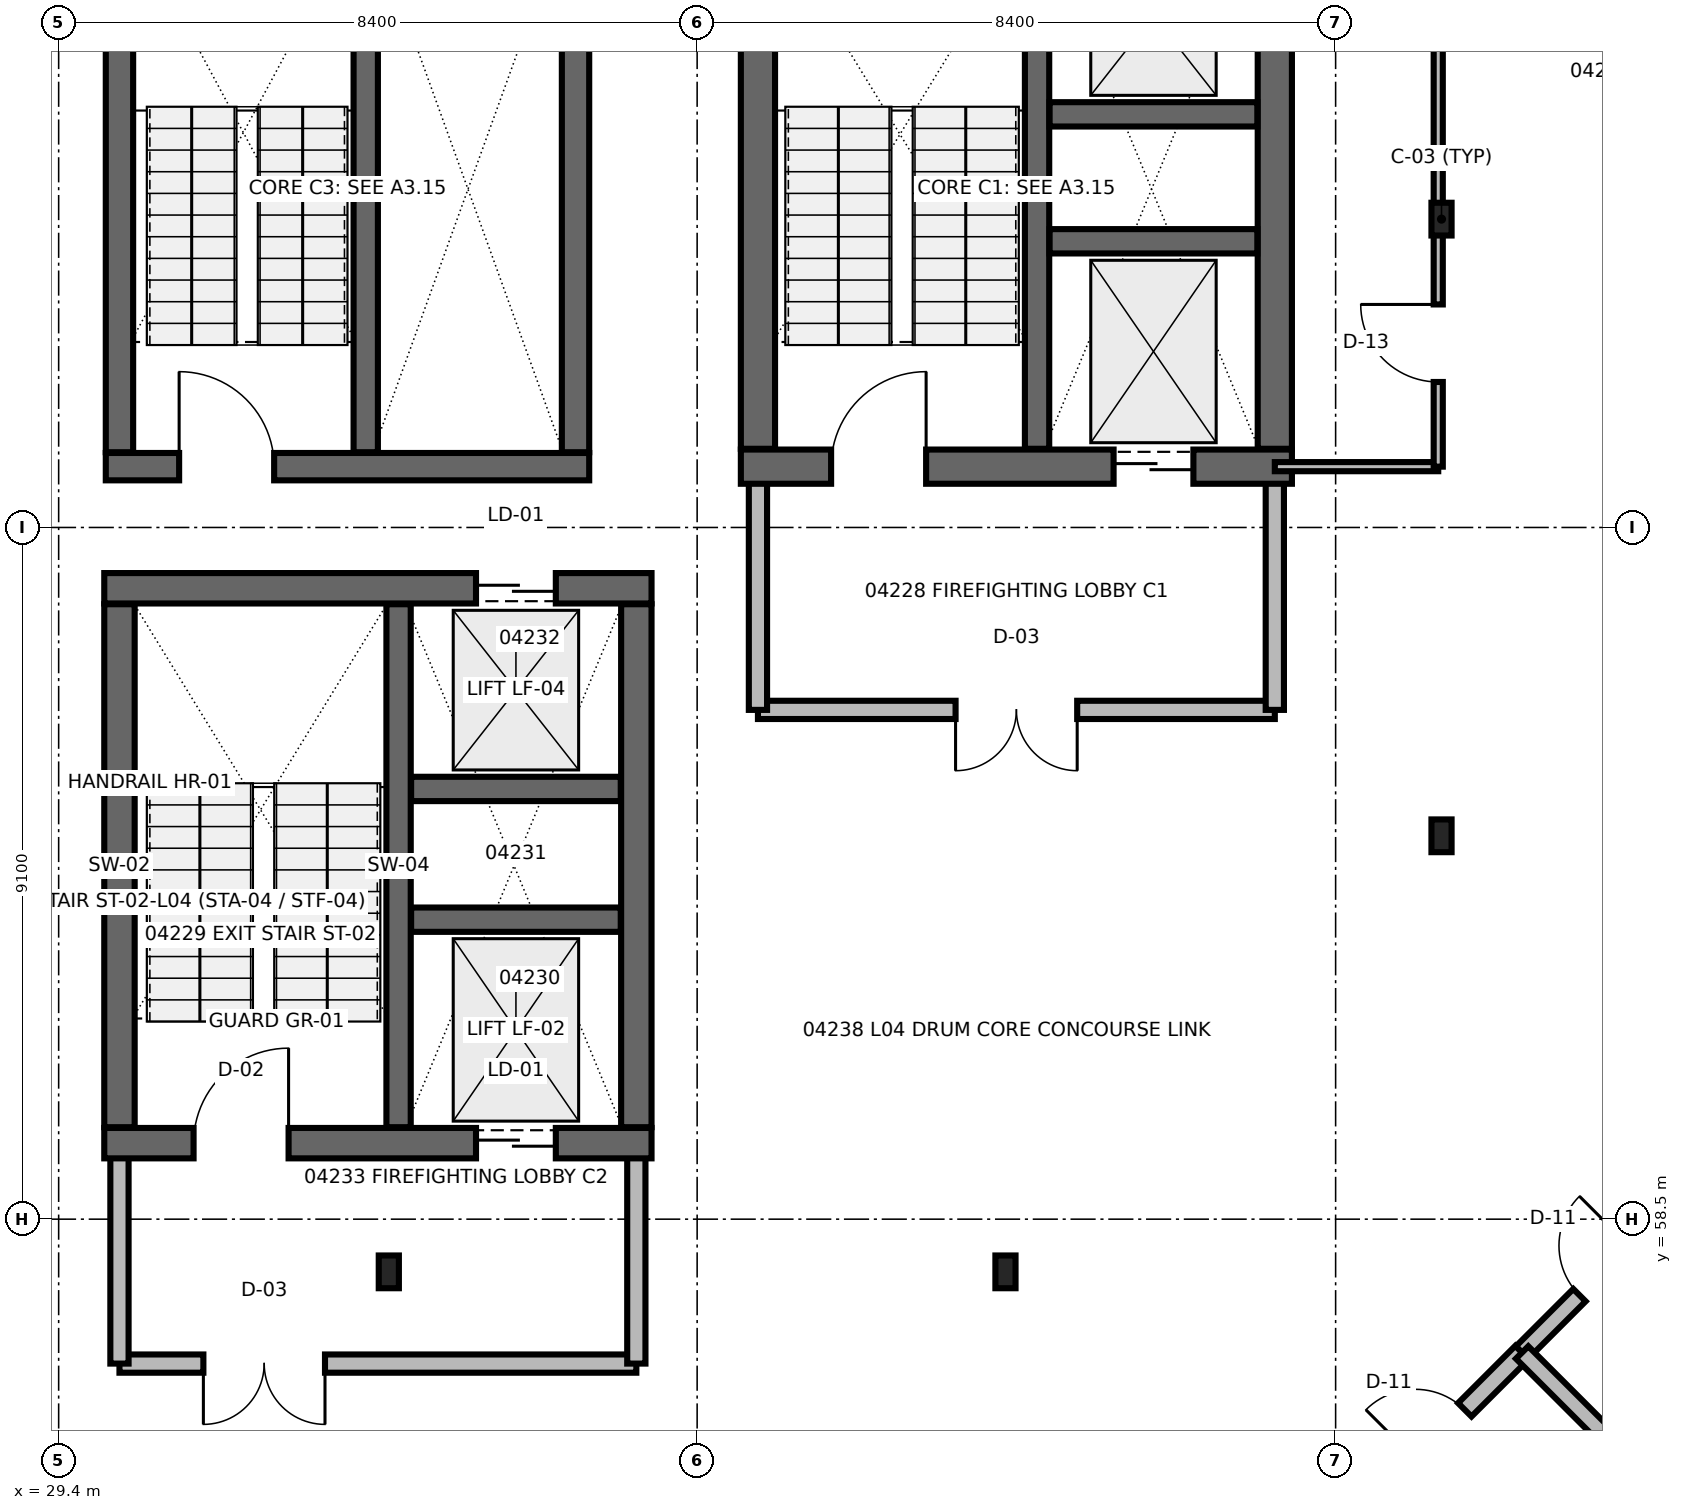
"""IFC4 building model, lengths in metres.
Left out: names, types, materials, properties, quantities, classifications, styles, units other than length and angle.
Written with IfcOpenShell. Run it as: python <this file> out.ifc"""

import sys

from ifc_helpers import new_model, si_unit, direction, frame, frame_2d, origin, origin_2d, place, context, subcontext, project, spatial, rectangle, i_section, extrude, element, fill, save


model = new_model("IFC4")
c1 = context("Model", 3, precision=1e-05, world=origin(), true_north=direction((0.0, 1.0)))
c2 = subcontext(c1, "Body", "Model", "MODEL_VIEW")
j1 = project(units=[si_unit("LENGTHUNIT", "METRE"), si_unit("PLANEANGLEUNIT", "RADIAN")], contexts=[c1])
p1 = place(None, origin())
s1 = spatial("IfcSite", under=j1, at=p1, CompositionType="ELEMENT")
p2 = place(p1, origin())
s2 = spatial("IfcBuilding", under=s1, at=p2, CompositionType="ELEMENT")
p3 = place(p2, frame((0.0, 0.0, 17.7)))
s3 = spatial("IfcBuildingStorey", under=s2, at=p3, CompositionType="ELEMENT", Elevation=17.7)
for number, where, z_axis, x_axis in (
    (1, (47.593, 71.656, 0.0), (0.0, 0.0, 1.0), (1.0, 0.0, 0.0)),
    (2, (33.744, 57.807, 0.0), (0.0, 0.0, 1.0), (1.0, 0.0, 0.0)),
    (3, (41.856, 57.807, 0.0), (0.0, 0.0, 1.0), (1.0, 0.0, 0.0)),
    (4, (47.593, 63.544, 0.0), (0.0, 0.0, 1.0), (1.0, 0.0, 0.0)),
):
    element("IfcColumn", number, at=place(p3, frame(where, z_axis=z_axis, x_axis=x_axis)), inside=s3, PredefinedType="COLUMN", context=c2, shape_type="SweptSolid", body=[
        extrude(i_section(OverallWidth=0.265, OverallDepth=0.431, WebThickness=0.015, FlangeThickness=0.025, at=origin_2d()), origin(), (0.0, 0.0, 1.0), 3.9),
    ])
p4 = place(p3, frame((49.072, 49.335, 0.0), z_axis=(0.0, 0.0, 1.0), x_axis=(0.707093322868, 0.707120239249, 0.0)))
e5 = element("IfcWall", 5, at=p4, inside=s3, PredefinedType="SOLIDWALL", context=c2, shape_type="SweptSolid", body=[
    extrude(rectangle(XDim=9.07, YDim=0.26, at=frame_2d((4.535, 0.0))), origin(), (0.0, 0.0, 1.0), 1.48),
])
p5 = place(p3, frame((38.6, 65.2, 0.0), z_axis=(0.0, 0.0, 1.0), x_axis=(1.0, 0.0, 0.0)))
e6 = element("IfcWall", 6, at=p5, inside=s3, PredefinedType="SOLIDWALL", context=c2, shape_type="SweptSolid", body=[
    extrude(rectangle(XDim=6.8, YDim=0.24, at=frame_2d((3.4, 0.0))), origin(), (0.0, 0.0, 1.0), 3.64),
])
p6 = place(p5, frame((2.6, 0.0, 0.0)))
e7 = element("IfcOpeningElement", 7, at=p6, cuts=e6, PredefinedType="OPENING", context=c2, shape_type="SweptSolid", body=[
    extrude(rectangle(XDim=1.6, YDim=2.2, at=frame_2d((0.8, 1.1))), frame((0.0, 0.13, 0.0), z_axis=(0.0, -1.0, 0.0), x_axis=(1.0, 0.0, 0.0)), (0.0, 0.0, 1.0), 0.26),
])
for number, where, z_axis, x_axis in (
    (8, (38.6, 68.4, 0.0), (0.0, 0.0, 1.0), (0.0, -1.0, 0.0)),
    (9, (45.4, 65.2, 0.0), (0.0, 0.0, 1.0), (0.0, 1.0, 0.0)),
):
    element("IfcWall", number, at=place(p3, frame(where, z_axis=z_axis, x_axis=x_axis)), inside=s3, PredefinedType="SOLIDWALL", context=c2, shape_type="SweptSolid", body=[
        extrude(rectangle(XDim=3.2, YDim=0.24, at=frame_2d((1.6, 0.0))), origin(), (0.0, 0.0, 1.0), 3.64),
    ])
p7 = place(p3, frame((38.375, 68.4, 0.0), z_axis=(0.0, 0.0, 1.0), x_axis=(1.0, 0.0, 0.0)))
e10 = element("IfcWall", 10, at=p7, inside=s3, PredefinedType="SHEAR", context=c2, shape_type="SweptSolid", body=[
    extrude(rectangle(XDim=7.25, YDim=0.45, at=frame_2d((3.625, 0.0))), origin(), (0.0, 0.0, 1.0), 3.62),
])
p8 = place(p7, frame((1.188, 0.0, 0.0)))
e11 = element("IfcOpeningElement", 11, at=p8, cuts=e10, PredefinedType="OPENING", context=c2, shape_type="SweptSolid", body=[
    extrude(rectangle(XDim=1.25, YDim=2.2, at=frame_2d((0.625, 1.1))), frame((0.0, 0.235, 0.0), z_axis=(0.0, -1.0, 0.0), x_axis=(1.0, 0.0, 0.0)), (0.0, 0.0, 1.0), 0.47),
])
p9 = place(p7, frame((4.904, 0.0, 0.0)))
e12 = element("IfcOpeningElement", 12, at=p9, cuts=e10, PredefinedType="OPENING", context=c2, shape_type="SweptSolid", body=[
    extrude(rectangle(XDim=1.05, YDim=2.15, at=frame_2d((0.525, 1.075))), frame((0.0, 0.235, 0.0), z_axis=(0.0, -1.0, 0.0), x_axis=(1.0, 0.0, 0.0)), (0.0, 0.0, 1.0), 0.47),
])
for number, where, z_axis, x_axis in (
    (13, (38.6, 68.635, 0.0), (0.0, 0.0, 1.0), (0.0, 1.0, 0.0)),
    (14, (45.4, 68.635, 0.0), (0.0, 0.0, 1.0), (0.0, 1.0, 0.0)),
):
    element("IfcWall", number, at=place(p3, frame(where, z_axis=z_axis, x_axis=x_axis)), inside=s3, PredefinedType="SHEAR", context=c2, shape_type="SweptSolid", body=[
        extrude(rectangle(XDim=6.83, YDim=0.45, at=frame_2d((3.415, 0.0))), origin(), (0.0, 0.0, 1.0), 3.62),
    ])
p10 = place(p3, frame((42.272, 68.635, 0.0), z_axis=(0.0, 0.0, 1.0), x_axis=(0.0, 1.0, 0.0)))
e15 = element("IfcWall", 15, at=p10, inside=s3, PredefinedType="SHEAR", context=c2, shape_type="SweptSolid", body=[
    extrude(rectangle(XDim=6.83, YDim=0.32, at=frame_2d((3.415, 0.0))), origin(), (0.0, 0.0, 1.0), 3.62),
])
for number, where, z_axis, x_axis in (
    (16, (42.437, 71.365, 0.0), (0.0, 0.0, 1.0), (1.0, 0.0, 0.0)),
    (17, (42.437, 73.035, 0.0), (0.0, 0.0, 1.0), (1.0, 0.0, 0.0)),
):
    element("IfcWall", number, at=place(p3, frame(where, z_axis=z_axis, x_axis=x_axis)), inside=s3, PredefinedType="SHEAR", context=c2, shape_type="SweptSolid", body=[
        extrude(rectangle(XDim=2.733, YDim=0.32, at=frame_2d((1.366, 0.0))), origin(), (0.0, 0.0, 1.0), 3.62),
    ])
p11 = place(p3, frame((30.2, 56.6, 0.0), z_axis=(0.0, 0.0, 1.0), x_axis=(1.0, 0.0, 0.0)))
e18 = element("IfcWall", 18, at=p11, inside=s3, PredefinedType="SOLIDWALL", context=c2, shape_type="SweptSolid", body=[
    extrude(rectangle(XDim=6.8, YDim=0.24, at=frame_2d((3.4, 0.0))), origin(), (0.0, 0.0, 1.0), 3.009),
])
p12 = place(p11, frame((1.104, 0.0, 0.0)))
e19 = element("IfcOpeningElement", 19, at=p12, cuts=e18, PredefinedType="OPENING", context=c2, shape_type="SweptSolid", body=[
    extrude(rectangle(XDim=1.6, YDim=2.2, at=frame_2d((0.8, 1.1))), frame((0.0, 0.13, 0.0), z_axis=(0.0, -1.0, 0.0), x_axis=(1.0, 0.0, 0.0)), (0.0, 0.0, 1.0), 0.26),
])
p13 = place(p3, frame((30.2, 59.5, 0.0), z_axis=(0.0, 0.0, 1.0), x_axis=(0.0, -1.0, 0.0)))
e20 = element("IfcWall", 20, at=p13, inside=s3, PredefinedType="SOLIDWALL", context=c2, shape_type="SweptSolid", body=[
    extrude(rectangle(XDim=2.9, YDim=0.24, at=frame_2d((1.45, 0.0))), origin(), (0.0, 0.0, 1.0), 3.64),
])
p14 = place(p3, frame((37.0, 56.6, 0.0), z_axis=(0.0, 0.0, 1.0), x_axis=(0.0, 1.0, 0.0)))
e21 = element("IfcWall", 21, at=p14, inside=s3, PredefinedType="SOLIDWALL", context=c2, shape_type="SweptSolid", body=[
    extrude(rectangle(XDim=2.9, YDim=0.24, at=frame_2d((1.45, 0.0))), origin(), (0.0, 0.0, 1.0), 3.009),
])
p15 = place(p3, frame((30.0, 59.5, 0.0), z_axis=(0.0, 0.0, 1.0), x_axis=(1.0, 0.0, 0.0)))
e22 = element("IfcWall", 22, at=p15, inside=s3, PredefinedType="SHEAR", context=c2, shape_type="SweptSolid", body=[
    extrude(rectangle(XDim=7.2, YDim=0.4, at=frame_2d((3.6, 0.0))), origin(), (0.0, 0.0, 1.0), 3.62),
])
p16 = place(p15, frame((1.175, 0.0, 0.0)))
e23 = element("IfcOpeningElement", 23, at=p16, cuts=e22, PredefinedType="OPENING", context=c2, shape_type="SweptSolid", body=[
    extrude(rectangle(XDim=1.25, YDim=2.2, at=frame_2d((0.625, 1.1))), frame((0.0, 0.21, 0.0), z_axis=(0.0, -1.0, 0.0), x_axis=(1.0, 0.0, 0.0)), (0.0, 0.0, 1.0), 0.42),
])
p17 = place(p15, frame((4.891, 0.0, 0.0)))
e24 = element("IfcOpeningElement", 24, at=p17, cuts=e22, PredefinedType="OPENING", context=c2, shape_type="SweptSolid", body=[
    extrude(rectangle(XDim=1.05, YDim=2.15, at=frame_2d((0.525, 1.075))), frame((0.0, 0.21, 0.0), z_axis=(0.0, -1.0, 0.0), x_axis=(1.0, 0.0, 0.0)), (0.0, 0.0, 1.0), 0.42),
])
p18 = place(p3, frame((30.0, 66.8, 0.0), z_axis=(0.0, 0.0, 1.0), x_axis=(1.0, 0.0, 0.0)))
e25 = element("IfcWall", 25, at=p18, inside=s3, PredefinedType="SHEAR", context=c2, shape_type="SweptSolid", body=[
    extrude(rectangle(XDim=7.2, YDim=0.4, at=frame_2d((3.6, 0.0))), origin(), (0.0, 0.0, 1.0), 3.62),
])
p19 = place(p18, frame((4.891, 0.0, 0.0)))
e26 = element("IfcOpeningElement", 26, at=p19, cuts=e25, PredefinedType="OPENING", context=c2, shape_type="SweptSolid", body=[
    extrude(rectangle(XDim=1.05, YDim=2.15, at=frame_2d((0.525, 1.075))), frame((0.0, 0.21, 0.0), z_axis=(0.0, -1.0, 0.0), x_axis=(1.0, 0.0, 0.0)), (0.0, 0.0, 1.0), 0.42),
])
for number, where, z_axis, x_axis in (
    (27, (30.2, 59.71, 0.0), (0.0, 0.0, 1.0), (0.0, 1.0, 0.0)),
    (28, (37.0, 59.71, 0.0), (0.0, 0.0, 1.0), (0.0, 1.0, 0.0)),
):
    element("IfcWall", number, at=place(p3, frame(where, z_axis=z_axis, x_axis=x_axis)), inside=s3, PredefinedType="SHEAR", context=c2, shape_type="SweptSolid", body=[
        extrude(rectangle(XDim=6.88, YDim=0.4, at=frame_2d((3.44, 0.0))), origin(), (0.0, 0.0, 1.0), 3.62),
    ])
p20 = place(p3, frame((33.872, 59.71, 0.0), z_axis=(0.0, 0.0, 1.0), x_axis=(0.0, 1.0, 0.0)))
e29 = element("IfcWall", 29, at=p20, inside=s3, PredefinedType="SHEAR", context=c2, shape_type="SweptSolid", body=[
    extrude(rectangle(XDim=6.88, YDim=0.32, at=frame_2d((3.44, 0.0))), origin(), (0.0, 0.0, 1.0), 3.62),
])
for number, where, z_axis, x_axis in (
    (30, (34.037, 62.44, 0.0), (0.0, 0.0, 1.0), (1.0, 0.0, 0.0)),
    (31, (34.037, 64.16, 0.0), (0.0, 0.0, 1.0), (1.0, 0.0, 0.0)),
):
    element("IfcWall", number, at=place(p3, frame(where, z_axis=z_axis, x_axis=x_axis)), inside=s3, PredefinedType="SHEAR", context=c2, shape_type="SweptSolid", body=[
        extrude(rectangle(XDim=2.758, YDim=0.32, at=frame_2d((1.379, 0.0))), origin(), (0.0, 0.0, 1.0), 3.62),
    ])
p21 = place(p3, frame((30.02, 68.4, 0.0), z_axis=(0.0, 0.0, 1.0), x_axis=(1.0, 0.0, 0.0)))
e32 = element("IfcWall", 32, at=p21, inside=s3, PredefinedType="SHEAR", context=c2, shape_type="SweptSolid", body=[
    extrude(rectangle(XDim=6.36, YDim=0.36, at=frame_2d((3.18, 0.0))), origin(), (0.0, 0.0, 1.0), 3.62),
])
p22 = place(p21, frame((0.965, 0.0, 0.0)))
e33 = element("IfcOpeningElement", 33, at=p22, cuts=e32, PredefinedType="OPENING", context=c2, shape_type="SweptSolid", body=[
    extrude(rectangle(XDim=1.25, YDim=2.2, at=frame_2d((0.625, 1.1))), frame((0.0, 0.19, 0.0), z_axis=(0.0, -1.0, 0.0), x_axis=(1.0, 0.0, 0.0)), (0.0, 0.0, 1.0), 0.38),
])
for number, where, z_axis, x_axis in (
    (34, (30.2, 68.59, 0.0), (0.0, 0.0, 1.0), (0.0, 1.0, 0.0)),
    (35, (36.2, 68.59, 0.0), (0.0, 0.0, 1.0), (0.0, 1.0, 0.0)),
):
    element("IfcWall", number, at=place(p3, frame(where, z_axis=z_axis, x_axis=x_axis)), inside=s3, PredefinedType="SHEAR", context=c2, shape_type="SweptSolid", body=[
        extrude(rectangle(XDim=6.92, YDim=0.36, at=frame_2d((3.46, 0.0))), origin(), (0.0, 0.0, 1.0), 3.62),
    ])
p23 = place(p3, frame((33.44, 68.59, 0.0), z_axis=(0.0, 0.0, 1.0), x_axis=(0.0, 1.0, 0.0)))
e36 = element("IfcWall", 36, at=p23, inside=s3, PredefinedType="SHEAR", context=c2, shape_type="SweptSolid", body=[
    extrude(rectangle(XDim=6.92, YDim=0.32, at=frame_2d((3.46, 0.0))), origin(), (0.0, 0.0, 1.0), 3.62),
])
p24 = place(p3, frame((46.495, 54.587, 0.0), z_axis=(0.0, 0.0, 1.0), x_axis=(0.707106781187, 0.707106781187, 0.0)))
e37 = element("IfcWall", 37, at=p24, inside=s3, PredefinedType="PLUMBINGWALL", context=c2, shape_type="SweptSolid", body=[
    extrude(rectangle(XDim=3.053, YDim=0.25, at=frame_2d((1.527, 0.0))), origin(), (0.0, 0.0, 1.0), 3.009),
])
p25 = place(p24, frame((1.067, 0.0, 0.0)))
e38 = element("IfcOpeningElement", 38, at=p25, cuts=e37, PredefinedType="OPENING", context=c2, shape_type="SweptSolid", body=[
    extrude(rectangle(XDim=0.92, YDim=2.1, at=frame_2d((0.46, 1.05))), frame((0.0, 0.135, 0.0), z_axis=(0.0, -1.0, 0.0), x_axis=(1.0, 0.0, 0.0)), (0.0, 0.0, 1.0), 0.27),
])
p26 = place(p3, frame((48.654, 56.746, 0.0), z_axis=(0.0, 0.0, 1.0), x_axis=(0.707106781187, 0.707106781187, 0.0)))
e39 = element("IfcWall", 39, at=p26, inside=s3, PredefinedType="PLUMBINGWALL", context=c2, shape_type="SweptSolid", body=[
    extrude(rectangle(XDim=3.053, YDim=0.23, at=frame_2d((1.527, 0.0))), origin(), (0.0, 0.0, 1.0), 3.64),
])
p27 = place(p26, frame((1.067, 0.0, 0.0)))
e40 = element("IfcOpeningElement", 40, at=p27, cuts=e39, PredefinedType="OPENING", context=c2, shape_type="SweptSolid", body=[
    extrude(rectangle(XDim=0.92, YDim=2.1, at=frame_2d((0.46, 1.05))), frame((0.0, 0.125, 0.0), z_axis=(0.0, -1.0, 0.0), x_axis=(1.0, 0.0, 0.0)), (0.0, 0.0, 1.0), 0.25),
])
p28 = place(p3, frame((48.05, 52.26, 0.0), z_axis=(0.0, 0.0, 1.0), x_axis=(0.707123738387, 0.707089823579, 0.0)))
e41 = element("IfcWall", 41, at=p28, inside=s3, PredefinedType="PLUMBINGWALL", context=c2, shape_type="SweptSolid", body=[
    extrude(rectangle(XDim=7.199, YDim=0.25, at=frame_2d((3.599, 0.0))), origin(), (0.0, 0.0, 1.0), 3.149),
])
p29 = place(p3, frame((48.654, 56.746, 0.0), z_axis=(0.0, 0.0, 1.0), x_axis=(0.707106781187, -0.707106781187, 0.0)))
e42 = element("IfcWall", 42, at=p29, inside=s3, PredefinedType="PLUMBINGWALL", context=c2, shape_type="SweptSolid", body=[
    extrude(rectangle(XDim=2.746, YDim=0.23, at=frame_2d((1.373, 0.0))), origin(), (0.0, 0.0, 1.0), 3.149),
])
p30 = place(p3, frame((45.4, 68.4, 0.0), z_axis=(0.0, 0.0, 1.0), x_axis=(1.0, 0.0, 0.0)))
e43 = element("IfcWall", 43, at=p30, inside=s3, PredefinedType="PARTITIONING", context=c2, shape_type="SweptSolid", body=[
    extrude(rectangle(XDim=2.15, YDim=0.12, at=frame_2d((1.075, 0.0))), origin(), (0.0, 0.0, 1.0), 3.64),
])
p31 = place(p3, frame((47.55, 68.4, 0.0), z_axis=(0.0, 0.0, 1.0), x_axis=(0.0, 1.0, 0.0)))
e44 = element("IfcWall", 44, at=p31, inside=s3, PredefinedType="PARTITIONING", context=c2, shape_type="SweptSolid", body=[
    extrude(rectangle(XDim=5.8, YDim=0.12, at=frame_2d((2.9, 0.0))), origin(), (0.0, 0.0, 1.0), 3.009),
])
p32 = place(p31, frame((1.114, 0.0, 0.0)))
e45 = element("IfcOpeningElement", 45, at=p32, cuts=e44, PredefinedType="OPENING", context=c2, shape_type="SweptSolid", body=[
    extrude(rectangle(XDim=1.02, YDim=2.2, at=frame_2d((0.51, 1.1))), frame((0.0, 0.07, 0.0), z_axis=(0.0, -1.0, 0.0), x_axis=(1.0, 0.0, 0.0)), (0.0, 0.0, 1.0), 0.14),
])
p33 = place(p6, frame((1.6, 0.0, 0.0), z_axis=(0.0, 0.0, 1.0), x_axis=(-1.0, 0.0, 0.0)))
e46 = element("IfcDoor", 46, at=p33, inside=s3, OperationType="DOUBLE_DOOR_SINGLE_SWING", PredefinedType="DOOR", context=c2, shape_type="SweptSolid", body=[
    extrude(rectangle(XDim=1.6, YDim=2.2, at=frame_2d((0.8, 1.1))), frame((0.0, 0.025, 0.0), z_axis=(0.0, -1.0, 0.0), x_axis=(1.0, 0.0, 0.0)), (0.0, 0.0, 1.0), 0.05),
])
fill(e7, e46)
p34 = place(p8, frame((1.25, 0.0, 0.0), z_axis=(0.0, 0.0, 1.0), x_axis=(-1.0, 0.0, 0.0)))
e47 = element("IfcDoor", 47, at=p34, inside=s3, OperationType="SINGLE_SWING_LEFT", PredefinedType="DOOR", context=c2, shape_type="SweptSolid", body=[
    extrude(rectangle(XDim=1.25, YDim=2.2, at=frame_2d((0.625, 1.1))), frame((0.0, 0.025, 0.0), z_axis=(0.0, -1.0, 0.0), x_axis=(1.0, 0.0, 0.0)), (0.0, 0.0, 1.0), 0.05),
])
fill(e11, e47)
p35 = place(p9, frame((1.05, 0.0, 0.0), z_axis=(0.0, 0.0, 1.0), x_axis=(-1.0, 0.0, 0.0)))
e48 = element("IfcDoor", 48, at=p35, inside=s3, OperationType="DOUBLE_DOOR_SLIDING", PredefinedType="DOOR", context=c2, shape_type="SweptSolid", body=[
    extrude(rectangle(XDim=1.05, YDim=2.15, at=frame_2d((0.525, 1.075))), frame((0.0, 0.025, 0.0), z_axis=(0.0, -1.0, 0.0), x_axis=(1.0, 0.0, 0.0)), (0.0, 0.0, 1.0), 0.05),
])
fill(e12, e48)
p36 = place(p12, frame((1.6, 0.0, 0.0), z_axis=(0.0, 0.0, 1.0), x_axis=(-1.0, 0.0, 0.0)))
e49 = element("IfcDoor", 49, at=p36, inside=s3, OperationType="DOUBLE_DOOR_SINGLE_SWING", PredefinedType="DOOR", context=c2, shape_type="SweptSolid", body=[
    extrude(rectangle(XDim=1.6, YDim=2.2, at=frame_2d((0.8, 1.1))), frame((0.0, 0.025, 0.0), z_axis=(0.0, -1.0, 0.0), x_axis=(1.0, 0.0, 0.0)), (0.0, 0.0, 1.0), 0.05),
])
fill(e19, e49)
p37 = place(p16, frame((1.25, 0.0, 0.0), z_axis=(0.0, 0.0, 1.0), x_axis=(-1.0, 0.0, 0.0)))
e50 = element("IfcDoor", 50, at=p37, inside=s3, OperationType="SINGLE_SWING_LEFT", PredefinedType="DOOR", context=c2, shape_type="SweptSolid", body=[
    extrude(rectangle(XDim=1.25, YDim=2.2, at=frame_2d((0.625, 1.1))), frame((0.0, 0.025, 0.0), z_axis=(0.0, -1.0, 0.0), x_axis=(1.0, 0.0, 0.0)), (0.0, 0.0, 1.0), 0.05),
])
fill(e23, e50)
p38 = place(p17, frame((1.05, 0.0, 0.0), z_axis=(0.0, 0.0, 1.0), x_axis=(-1.0, 0.0, 0.0)))
e51 = element("IfcDoor", 51, at=p38, inside=s3, OperationType="DOUBLE_DOOR_SLIDING", PredefinedType="DOOR", context=c2, shape_type="SweptSolid", body=[
    extrude(rectangle(XDim=1.05, YDim=2.15, at=frame_2d((0.525, 1.075))), frame((0.0, 0.025, 0.0), z_axis=(0.0, -1.0, 0.0), x_axis=(1.0, 0.0, 0.0)), (0.0, 0.0, 1.0), 0.05),
])
fill(e24, e51)
p39 = place(p19, origin())
e52 = element("IfcDoor", 52, at=p39, inside=s3, OperationType="DOUBLE_DOOR_SLIDING", PredefinedType="DOOR", context=c2, shape_type="SweptSolid", body=[
    extrude(rectangle(XDim=1.05, YDim=2.15, at=frame_2d((0.525, 1.075))), frame((0.0, 0.025, 0.0), z_axis=(0.0, -1.0, 0.0), x_axis=(1.0, 0.0, 0.0)), (0.0, 0.0, 1.0), 0.05),
])
fill(e26, e52)
p40 = place(p22, frame((1.25, 0.0, 0.0), z_axis=(0.0, 0.0, 1.0), x_axis=(-1.0, 0.0, 0.0)))
e53 = element("IfcDoor", 53, at=p40, inside=s3, OperationType="SINGLE_SWING_RIGHT", PredefinedType="DOOR", context=c2, shape_type="SweptSolid", body=[
    extrude(rectangle(XDim=1.25, YDim=2.2, at=frame_2d((0.625, 1.1))), frame((0.0, 0.025, 0.0), z_axis=(0.0, -1.0, 0.0), x_axis=(1.0, 0.0, 0.0)), (0.0, 0.0, 1.0), 0.05),
])
fill(e33, e53)
p41 = place(p25, frame((0.92, 0.0, 0.0), z_axis=(0.0, 0.0, 1.0), x_axis=(-1.0, 0.0, 0.0)))
e54 = element("IfcDoor", 54, at=p41, inside=s3, OperationType="SINGLE_SWING_RIGHT", PredefinedType="DOOR", context=c2, shape_type="SweptSolid", body=[
    extrude(rectangle(XDim=0.92, YDim=2.1, at=frame_2d((0.46, 1.05))), frame((0.0, 0.025, 0.0), z_axis=(0.0, -1.0, 0.0), x_axis=(1.0, 0.0, 0.0)), (0.0, 0.0, 1.0), 0.05),
])
fill(e38, e54)
p42 = place(p27, frame((0.92, 0.0, 0.0), z_axis=(0.0, 0.0, 1.0), x_axis=(-1.0, 0.0, 0.0)))
e55 = element("IfcDoor", 55, at=p42, inside=s3, OperationType="SINGLE_SWING_LEFT", PredefinedType="DOOR", context=c2, shape_type="SweptSolid", body=[
    extrude(rectangle(XDim=0.92, YDim=2.1, at=frame_2d((0.46, 1.05))), frame((0.0, 0.025, 0.0), z_axis=(0.0, -1.0, 0.0), x_axis=(1.0, 0.0, 0.0)), (0.0, 0.0, 1.0), 0.05),
])
fill(e40, e55)
p43 = place(p32, origin())
e56 = element("IfcDoor", 56, at=p43, inside=s3, OperationType="SINGLE_SWING_RIGHT", PredefinedType="DOOR", context=c2, shape_type="SweptSolid", body=[
    extrude(rectangle(XDim=1.02, YDim=2.2, at=frame_2d((0.51, 1.1))), frame((0.0, 0.025, 0.0), z_axis=(0.0, -1.0, 0.0), x_axis=(1.0, 0.0, 0.0)), (0.0, 0.0, 1.0), 0.05),
])
fill(e45, e56)
save(model, sys.argv[1])
